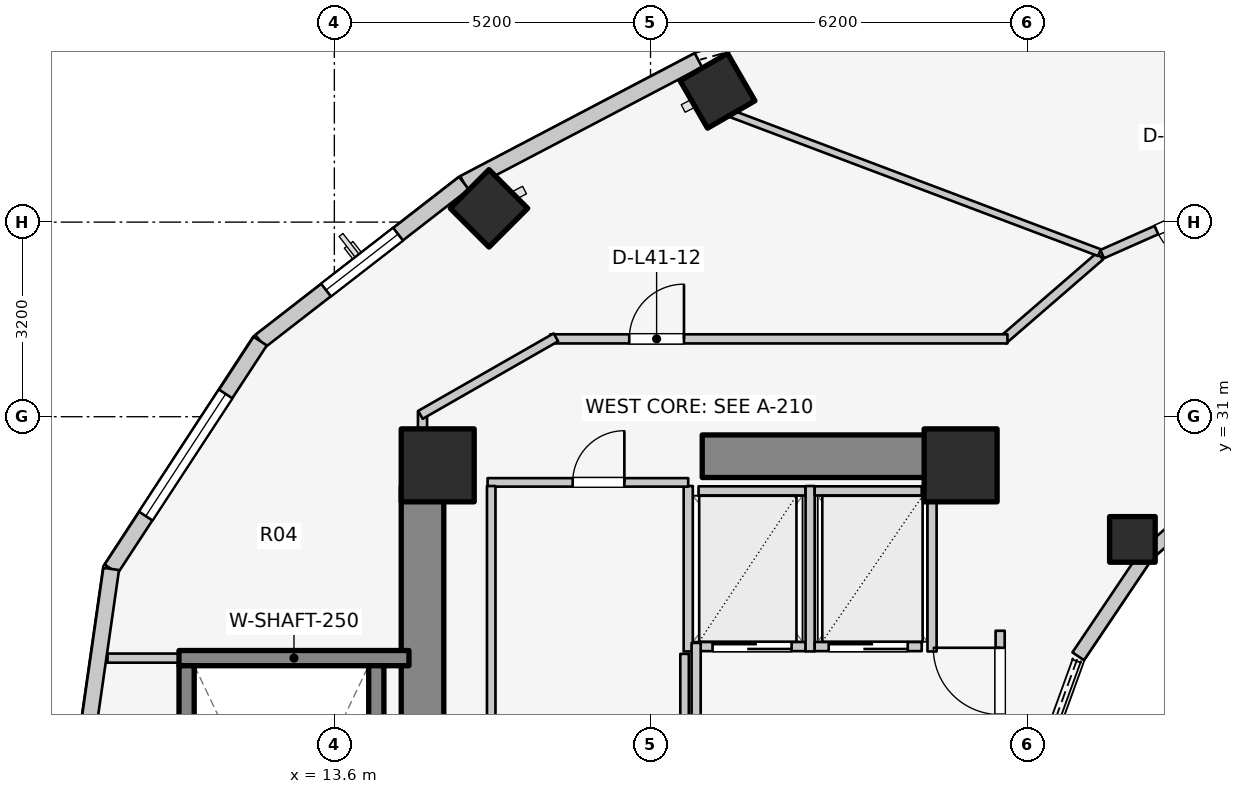
"""IFC4 building model, lengths in metres.
Left out: names, types, materials, properties, quantities, classifications, styles, units other than length and angle.
Written with IfcOpenShell. Run it as: python <this file> out.ifc"""

import sys

from ifc_helpers import new_model, si_unit, direction, frame, frame_2d, origin, origin_2d, place, context, subcontext, project, spatial, rectangle, extrude, element, fill, save


model = new_model("IFC4")
c1 = context("Model", 3, precision=1e-05, world=origin(), true_north=direction((0.0, 1.0)))
c2 = subcontext(c1, "Body", "Model", "MODEL_VIEW")
j1 = project(units=[si_unit("LENGTHUNIT", "METRE"), si_unit("PLANEANGLEUNIT", "RADIAN")], contexts=[c1])
p1 = place(None, origin())
s1 = spatial("IfcSite", under=j1, at=p1, CompositionType="ELEMENT")
p2 = place(p1, origin())
s2 = spatial("IfcBuilding", under=s1, at=p2, CompositionType="ELEMENT")
p3 = place(p2, frame((0.0, 0.0, 137.4)))
s3 = spatial("IfcBuildingStorey", under=s2, at=p3, CompositionType="ELEMENT", Elevation=137.4)
p4 = place(p3, frame((15.05, 17.05, 0.0), z_axis=(0.0, 0.0, 1.0), x_axis=(0.0, 1.0, 0.0)))
e1 = element("IfcWall", 1, at=p4, inside=s3, PredefinedType="SHEAR", context=c2, shape_type="SweptSolid", body=[
    extrude(rectangle(XDim=12.8, YDim=0.7, at=frame_2d((6.4, 0.0))), origin(), (0.0, 0.0, 1.0), 3.1),
])
p5 = place(p3, frame((19.65, 30.35, 0.0), z_axis=(0.0, 0.0, 1.0), x_axis=(1.0, 0.0, 0.0)))
e2 = element("IfcWall", 2, at=p5, inside=s3, PredefinedType="SHEAR", context=c2, shape_type="SweptSolid", body=[
    extrude(rectangle(XDim=4.5, YDim=0.7, at=frame_2d((2.25, 0.0))), origin(), (0.0, 0.0, 1.0), 3.1),
])
p6 = place(p3, frame((11.045, 27.03, 0.0), z_axis=(0.0, 0.0, 1.0), x_axis=(1.0, 0.0, 0.0)))
e3 = element("IfcWall", 3, at=p6, inside=s3, PredefinedType="SOLIDWALL", context=c2, shape_type="SweptSolid", body=[
    extrude(rectangle(XDim=3.782, YDim=0.25, at=frame_2d((1.891, 0.0))), origin(), (0.0, 0.0, 1.0), 3.1),
])
for number, where, z_axis, x_axis in (
    (4, (11.17, 19.095, 0.0), (0.0, 0.0, 1.0), (0.0, 1.0, 0.0)),
    (5, (14.29, 19.095, 0.0), (0.0, 0.0, 1.0), (0.0, 1.0, 0.0)),
):
    element("IfcWall", number, at=place(p3, frame(where, z_axis=z_axis, x_axis=x_axis)), inside=s3, PredefinedType="SOLIDWALL", context=c2, shape_type="SweptSolid", body=[
        extrude(rectangle(XDim=7.81, YDim=0.25, at=frame_2d((3.905, 0.0))), origin(), (0.0, 0.0, 1.0), 3.1),
    ])
for number, where, z_axis, x_axis in (
    (6, (23.9, 30.2, 0.0), (0.0, 0.0, 1.0), (1.0, 0.0, 0.0)),
    (7, (15.3, 30.2, 0.0), (0.0, 0.0, 1.0), (1.0, 0.0, 0.0)),
):
    element("IfcColumn", number, at=place(p3, frame(where, z_axis=z_axis, x_axis=x_axis)), inside=s3, PredefinedType="COLUMN", context=c2, shape_type="SweptSolid", body=[
        extrude(rectangle(XDim=1.2, YDim=1.2, at=origin_2d()), origin(), (0.0, 0.0, 1.0), 3.1),
    ])
p7 = place(p3, frame((19.902, 36.359, 0.0), z_axis=(0.0, 0.0, 1.0), x_axis=(-0.5, 0.866025403784, 0.0)))
e8 = element("IfcColumn", 8, at=p7, inside=s3, PredefinedType="COLUMN", context=c2, shape_type="SweptSolid", body=[
    extrude(rectangle(XDim=0.9, YDim=0.9, at=origin_2d()), origin(), (0.0, 0.0, 1.0), 3.1),
])
p8 = place(p3, frame((26.725, 28.982, 0.0), z_axis=(0.0, 0.0, 1.0), x_axis=(1.0, 0.0, 0.0)))
e9 = element("IfcColumn", 9, at=p8, inside=s3, PredefinedType="COLUMN", context=c2, shape_type="SweptSolid", body=[
    extrude(rectangle(XDim=0.75, YDim=0.75, at=origin_2d()), origin(), (0.0, 0.0, 1.0), 3.1),
])
p9 = place(p3, frame((16.143, 34.427, 0.0), z_axis=(0.0, 0.0, 1.0), x_axis=(-0.707106781187, 0.707106781187, 0.0)))
e10 = element("IfcColumn", 10, at=p9, inside=s3, PredefinedType="COLUMN", context=c2, shape_type="SweptSolid", body=[
    extrude(rectangle(XDim=0.9, YDim=0.9, at=origin_2d()), origin(), (0.0, 0.0, 1.0), 3.1),
])
p10 = place(p3, frame((28.44, 30.032, 0.0), z_axis=(0.0, 0.0, 1.0), x_axis=(-0.752576694707, -0.658504607869, 0.0)))
e11 = element("IfcWall", 11, at=p10, inside=s3, PredefinedType="STANDARD", context=c2, shape_type="SweptSolid", body=[
    extrude(rectangle(XDim=1.959, YDim=0.23, at=frame_2d((0.98, 0.0))), origin(), (0.0, 0.0, 1.0), 2.16),
])
p11 = place(p3, frame((26.965, 28.742, 0.0), z_axis=(0.0, 0.0, 1.0), x_axis=(-0.558197800898, -0.829707909492, 0.0)))
e12 = element("IfcWall", 12, at=p11, inside=s3, PredefinedType="STANDARD", context=c2, shape_type="SweptSolid", body=[
    extrude(rectangle(XDim=2.027, YDim=0.23, at=frame_2d((1.013, 0.0))), origin(), (0.0, 0.0, 1.0), 2.16),
])
p12 = place(p3, frame((19.587, 36.863, 0.0), z_axis=(0.0, 0.0, 1.0), x_axis=(-0.885660265226, -0.464333818065, 0.0)))
e13 = element("IfcWall", 13, at=p12, inside=s3, PredefinedType="STANDARD", context=c2, shape_type="SweptSolid", body=[
    extrude(rectangle(XDim=4.354, YDim=0.26, at=frame_2d((2.177, 0.0))), origin(), (0.0, 0.0, 1.0), 2.85),
])
p13 = place(p3, frame((15.731, 34.842, 0.0), z_axis=(0.0, 0.0, 1.0), x_axis=(-0.790185650662, -0.612867552973, 0.0)))
e14 = element("IfcWall", 14, at=p13, inside=s3, PredefinedType="STANDARD", context=c2, shape_type="SweptSolid", body=[
    extrude(rectangle(XDim=4.239, YDim=0.26, at=frame_2d((2.12, 0.0))), origin(), (0.0, 0.0, 1.0), 2.85),
])
p14 = place(p13, frame((1.37, 0.0, 0.75)))
e15 = element("IfcOpeningElement", 15, at=p14, cuts=e14, PredefinedType="OPENING", context=c2, shape_type="SweptSolid", body=[
    extrude(rectangle(XDim=1.5, YDim=1.6, at=frame_2d((0.75, 0.8))), frame((0.0, 0.14, 0.0), z_axis=(0.0, -1.0, 0.0), x_axis=(1.0, 0.0, 0.0)), (0.0, 0.0, 1.0), 0.28),
])
p15 = place(p3, frame((12.381, 32.243, 0.0), z_axis=(0.0, 0.0, 1.0), x_axis=(-0.547456494366, -0.836834145322, 0.0)))
e16 = element("IfcWall", 16, at=p15, inside=s3, PredefinedType="STANDARD", context=c2, shape_type="SweptSolid", body=[
    extrude(rectangle(XDim=4.477, YDim=0.26, at=frame_2d((2.239, 0.0))), origin(), (0.0, 0.0, 1.0), 2.85),
])
p16 = place(p15, frame((1.039, 0.0, 0.75)))
e17 = element("IfcOpeningElement", 17, at=p16, cuts=e16, PredefinedType="OPENING", context=c2, shape_type="SweptSolid", body=[
    extrude(rectangle(XDim=2.4, YDim=1.7, at=frame_2d((1.2, 0.85))), frame((0.0, 0.14, 0.0), z_axis=(0.0, -1.0, 0.0), x_axis=(1.0, 0.0, 0.0)), (0.0, 0.0, 1.0), 0.28),
])
p17 = place(p3, frame((9.93, 28.497, 0.0), z_axis=(0.0, 0.0, 1.0), x_axis=(-0.142227632286, -0.989833976288, 0.0)))
e18 = element("IfcWall", 18, at=p17, inside=s3, PredefinedType="STANDARD", context=c2, shape_type="SweptSolid", body=[
    extrude(rectangle(XDim=5.553, YDim=0.26, at=frame_2d((2.776, 0.0))), origin(), (0.0, 0.0, 1.0), 2.85),
])
p18 = place(p17, frame((2.892, 0.0, 0.75)))
e19 = element("IfcOpeningElement", 19, at=p18, cuts=e18, PredefinedType="OPENING", context=c2, shape_type="SweptSolid", body=[
    extrude(rectangle(XDim=1.2, YDim=1.5, at=frame_2d((0.6, 0.75))), frame((0.0, 0.14, 0.0), z_axis=(0.0, -1.0, 0.0), x_axis=(1.0, 0.0, 0.0)), (0.0, 0.0, 1.0), 0.28),
])
p19 = place(p3, frame((19.59, 27.22, 0.0), z_axis=(0.0, 0.0, 1.0), x_axis=(1.0, 0.0, 0.0)))
e20 = element("IfcWall", 20, at=p19, inside=s3, PredefinedType="SOLIDWALL", context=c2, shape_type="SweptSolid", body=[
    extrude(rectangle(XDim=1.76, YDim=0.15, at=frame_2d((0.88, 0.0))), origin(), (0.0, 0.0, 1.0), 2.855),
])
p20 = place(p19, frame((0.23, 0.0, 0.0)))
e21 = element("IfcOpeningElement", 21, at=p20, cuts=e20, PredefinedType="OPENING", context=c2, shape_type="SweptSolid", body=[
    extrude(rectangle(XDim=1.3, YDim=2.1, at=frame_2d((0.65, 1.05))), frame((0.0, 0.085, 0.0), z_axis=(0.0, -1.0, 0.0), x_axis=(1.0, 0.0, 0.0)), (0.0, 0.0, 1.0), 0.17),
])
p21 = place(p3, frame((19.59, 29.78, 0.0), z_axis=(0.0, 0.0, 1.0), x_axis=(1.0, 0.0, 0.0)))
e22 = element("IfcWall", 22, at=p21, inside=s3, PredefinedType="SOLIDWALL", context=c2, shape_type="SweptSolid", body=[
    extrude(rectangle(XDim=1.76, YDim=0.15, at=frame_2d((0.88, 0.0))), origin(), (0.0, 0.0, 1.0), 2.855),
])
for number, where, z_axis, x_axis in (
    (23, (19.42, 27.14, 0.0), (0.0, 0.0, 1.0), (0.0, 1.0, 0.0)),
    (24, (21.425, 27.14, 0.0), (0.0, 0.0, 1.0), (0.0, 1.0, 0.0)),
):
    element("IfcWall", number, at=place(p3, frame(where, z_axis=z_axis, x_axis=x_axis)), inside=s3, PredefinedType="SOLIDWALL", context=c2, shape_type="SweptSolid", body=[
        extrude(rectangle(XDim=2.72, YDim=0.15, at=frame_2d((1.36, 0.0))), origin(), (0.0, 0.0, 1.0), 2.855),
    ])
p22 = place(p3, frame((21.5, 27.22, 0.0), z_axis=(0.0, 0.0, 1.0), x_axis=(1.0, 0.0, 0.0)))
e25 = element("IfcWall", 25, at=p22, inside=s3, PredefinedType="SOLIDWALL", context=c2, shape_type="SweptSolid", body=[
    extrude(rectangle(XDim=1.76, YDim=0.15, at=frame_2d((0.88, 0.0))), origin(), (0.0, 0.0, 1.0), 2.855),
])
p23 = place(p22, frame((0.23, 0.0, 0.0)))
e26 = element("IfcOpeningElement", 26, at=p23, cuts=e25, PredefinedType="OPENING", context=c2, shape_type="SweptSolid", body=[
    extrude(rectangle(XDim=1.3, YDim=2.1, at=frame_2d((0.65, 1.05))), frame((0.0, 0.085, 0.0), z_axis=(0.0, -1.0, 0.0), x_axis=(1.0, 0.0, 0.0)), (0.0, 0.0, 1.0), 0.17),
])
p24 = place(p3, frame((21.5, 29.78, 0.0), z_axis=(0.0, 0.0, 1.0), x_axis=(1.0, 0.0, 0.0)))
e27 = element("IfcWall", 27, at=p24, inside=s3, PredefinedType="SOLIDWALL", context=c2, shape_type="SweptSolid", body=[
    extrude(rectangle(XDim=1.76, YDim=0.15, at=frame_2d((0.88, 0.0))), origin(), (0.0, 0.0, 1.0), 2.855),
])
p25 = place(p3, frame((23.43, 27.14, 0.0), z_axis=(0.0, 0.0, 1.0), x_axis=(0.0, 1.0, 0.0)))
e28 = element("IfcWall", 28, at=p25, inside=s3, PredefinedType="SOLIDWALL", context=c2, shape_type="SweptSolid", body=[
    extrude(rectangle(XDim=2.72, YDim=0.15, at=frame_2d((1.36, 0.0))), origin(), (0.0, 0.0, 1.0), 2.855),
])
p26 = place(p3, frame((19.55, 24.08, 0.0), z_axis=(0.0, 0.0, 1.0), x_axis=(0.0, 1.0, 0.0)))
e29 = element("IfcWall", 29, at=p26, inside=s3, PredefinedType="PARTITIONING", context=c2, shape_type="SweptSolid", body=[
    extrude(rectangle(XDim=3.2, YDim=0.15, at=frame_2d((1.6, 0.0))), origin(), (0.0, 0.0, 1.0), 2.855),
])
p27 = place(p3, frame((24.55, 24.08, 0.0), z_axis=(0.0, 0.0, 1.0), x_axis=(0.0, 1.0, 0.0)))
e30 = element("IfcWall", 30, at=p27, inside=s3, PredefinedType="PARTITIONING", context=c2, shape_type="SweptSolid", body=[
    extrude(rectangle(XDim=3.4, YDim=0.15, at=frame_2d((1.7, 0.0))), origin(), (0.0, 0.0, 1.0), 2.855),
])
p28 = place(p27, frame((2.02, 0.0, 0.0)))
e31 = element("IfcOpeningElement", 31, at=p28, cuts=e30, PredefinedType="OPENING", context=c2, shape_type="SweptSolid", body=[
    extrude(rectangle(XDim=1.1, YDim=2.1, at=frame_2d((0.55, 1.05))), frame((0.0, 0.085, 0.0), z_axis=(0.0, -1.0, 0.0), x_axis=(1.0, 0.0, 0.0)), (0.0, 0.0, 1.0), 0.17),
])
p29 = place(p3, frame((16.12, 29.92, 0.0), z_axis=(0.0, 0.0, 1.0), x_axis=(1.0, 0.0, 0.0)))
e32 = element("IfcWall", 32, at=p29, inside=s3, PredefinedType="PLUMBINGWALL", context=c2, shape_type="SweptSolid", body=[
    extrude(rectangle(XDim=3.3, YDim=0.14, at=frame_2d((1.65, 0.0))), origin(), (0.0, 0.0, 1.0), 2.855),
])
p30 = place(p29, frame((1.399, 0.0, 0.0)))
e33 = element("IfcOpeningElement", 33, at=p30, cuts=e32, PredefinedType="OPENING", context=c2, shape_type="SweptSolid", body=[
    extrude(rectangle(XDim=0.85, YDim=2.05, at=frame_2d((0.425, 1.025))), frame((0.0, 0.08, 0.0), z_axis=(0.0, -1.0, 0.0), x_axis=(1.0, 0.0, 0.0)), (0.0, 0.0, 1.0), 0.16),
])
p31 = place(p3, frame((16.18, 25.98, 0.0), z_axis=(0.0, 0.0, 1.0), x_axis=(0.0, 1.0, 0.0)))
e34 = element("IfcWall", 34, at=p31, inside=s3, PredefinedType="PLUMBINGWALL", context=c2, shape_type="SweptSolid", body=[
    extrude(rectangle(XDim=3.88, YDim=0.14, at=frame_2d((1.94, 0.0))), origin(), (0.0, 0.0, 1.0), 2.855),
])
p32 = place(p3, frame((19.36, 25.98, 0.0), z_axis=(0.0, 0.0, 1.0), x_axis=(0.0, 1.0, 0.0)))
e35 = element("IfcWall", 35, at=p32, inside=s3, PredefinedType="PLUMBINGWALL", context=c2, shape_type="SweptSolid", body=[
    extrude(rectangle(XDim=1.12, YDim=0.14, at=frame_2d((0.56, 0.0))), origin(), (0.0, 0.0, 1.0), 2.855),
])
p33 = place(p3, frame((9.87, 27.03, 0.0), z_axis=(0.0, 0.0, 1.0), x_axis=(1.0, 0.0, 0.0)))
e36 = element("IfcWall", 36, at=p33, inside=s3, PredefinedType="PARTITIONING", context=c2, shape_type="SweptSolid", body=[
    extrude(rectangle(XDim=1.17, YDim=0.15, at=frame_2d((0.585, 0.0))), origin(), (0.0, 0.0, 1.0), 2.855),
])
p34 = place(p3, frame((15.05, 29.8, 0.0), z_axis=(0.0, 0.0, 1.0), x_axis=(0.0, 1.0, 0.0)))
e37 = element("IfcWall", 37, at=p34, inside=s3, PredefinedType="PARTITIONING", context=c2, shape_type="SweptSolid", body=[
    extrude(rectangle(XDim=1.29, YDim=0.15, at=frame_2d((0.645, 0.0))), origin(), (0.0, 0.0, 1.0), 2.855),
])
p35 = place(p3, frame((26.193, 33.642, 0.0), z_axis=(0.0, 0.0, 1.0), x_axis=(-0.756055312247, -0.654507727092, 0.0)))
e38 = element("IfcWall", 38, at=p35, inside=s3, PredefinedType="PARTITIONING", context=c2, shape_type="SweptSolid", body=[
    extrude(rectangle(XDim=2.111, YDim=0.15, at=frame_2d((1.055, 0.0))), origin(), (0.0, 0.0, 1.0), 2.299),
])
p36 = place(p3, frame((17.15, 32.28, 0.0), z_axis=(0.0, 0.0, 1.0), x_axis=(1.0, 0.0, 0.0)))
e39 = element("IfcWall", 39, at=p36, inside=s3, PredefinedType="PARTITIONING", context=c2, shape_type="SweptSolid", body=[
    extrude(rectangle(XDim=7.52, YDim=0.15, at=frame_2d((3.76, 0.0))), origin(), (0.0, 0.0, 1.0), 2.299),
])
p37 = place(p36, frame((1.3, 0.0, 0.0)))
e40 = element("IfcOpeningElement", 40, at=p37, cuts=e39, PredefinedType="OPENING", context=c2, shape_type="SweptSolid", body=[
    extrude(rectangle(XDim=0.9, YDim=2.1, at=frame_2d((0.45, 1.05))), frame((0.0, 0.085, 0.0), z_axis=(0.0, -1.0, 0.0), x_axis=(1.0, 0.0, 0.0)), (0.0, 0.0, 1.0), 0.17),
])
p38 = place(p3, frame((17.243, 32.305, 0.0), z_axis=(0.0, 0.0, 1.0), x_axis=(-0.867991349648, -0.496579315857, 0.0)))
e41 = element("IfcWall", 41, at=p38, inside=s3, PredefinedType="PARTITIONING", context=c2, shape_type="SweptSolid", body=[
    extrude(rectangle(XDim=2.567, YDim=0.15, at=frame_2d((1.283, 0.0))), origin(), (0.0, 0.0, 1.0), 2.22),
])
p39 = place(p3, frame((26.184, 33.698, 0.0), z_axis=(0.0, 0.0, 1.0), x_axis=(-0.935601484289, 0.353057874288, 0.0)))
e42 = element("IfcWall", 42, at=p39, inside=s3, PredefinedType="MOVABLE", context=c2, shape_type="SweptSolid", body=[
    extrude(rectangle(XDim=6.484, YDim=0.12, at=frame_2d((3.242, 0.0))), origin(), (0.0, 0.0, 1.0), 2.299),
])
p40 = place(p3, frame((29.018, 34.91, 0.0), z_axis=(0.0, 0.0, 1.0), x_axis=(-0.914216890927, -0.405225216815, 0.0)))
e43 = element("IfcWall", 43, at=p40, inside=s3, PredefinedType="PARTITIONING", context=c2, shape_type="SweptSolid", body=[
    extrude(rectangle(XDim=3.052, YDim=0.15, at=frame_2d((1.526, 0.0))), origin(), (0.0, 0.0, 1.0), 2.299),
])
p41 = place(p40, frame((0.976, 0.0, 0.0)))
e44 = element("IfcOpeningElement", 44, at=p41, cuts=e43, PredefinedType="OPENING", context=c2, shape_type="SweptSolid", body=[
    extrude(rectangle(XDim=1.1, YDim=2.1, at=frame_2d((0.55, 1.05))), frame((0.0, 0.085, 0.0), z_axis=(0.0, -1.0, 0.0), x_axis=(1.0, 0.0, 0.0)), (0.0, 0.0, 1.0), 0.17),
])
p42 = place(p14, origin())
e45 = element("IfcWindow", 45, at=p42, inside=s3, PartitioningType="SINGLE_PANEL", PredefinedType="WINDOW", context=c2, shape_type="SweptSolid", body=[
    extrude(rectangle(XDim=1.5, YDim=1.6, at=frame_2d((0.75, 0.8))), frame((0.0, 0.03, 0.0), z_axis=(0.0, -1.0, 0.0), x_axis=(1.0, 0.0, 0.0)), (0.0, 0.0, 1.0), 0.06),
])
fill(e15, e45)
p43 = place(p16, origin())
e46 = element("IfcWindow", 46, at=p43, inside=s3, PartitioningType="SINGLE_PANEL", PredefinedType="WINDOW", context=c2, shape_type="SweptSolid", body=[
    extrude(rectangle(XDim=2.4, YDim=1.7, at=frame_2d((1.2, 0.85))), frame((0.0, 0.03, 0.0), z_axis=(0.0, -1.0, 0.0), x_axis=(1.0, 0.0, 0.0)), (0.0, 0.0, 1.0), 0.06),
])
fill(e17, e46)
p44 = place(p20, origin())
e47 = element("IfcDoor", 47, at=p44, inside=s3, OperationType="DOUBLE_DOOR_SLIDING", PredefinedType="DOOR", context=c2, shape_type="SweptSolid", body=[
    extrude(rectangle(XDim=1.3, YDim=2.1, at=frame_2d((0.65, 1.05))), frame((0.0, 0.025, 0.0), z_axis=(0.0, -1.0, 0.0), x_axis=(1.0, 0.0, 0.0)), (0.0, 0.0, 1.0), 0.05),
])
fill(e21, e47)
p45 = place(p23, origin())
e48 = element("IfcDoor", 48, at=p45, inside=s3, OperationType="DOUBLE_DOOR_SLIDING", PredefinedType="DOOR", context=c2, shape_type="SweptSolid", body=[
    extrude(rectangle(XDim=1.3, YDim=2.1, at=frame_2d((0.65, 1.05))), frame((0.0, 0.025, 0.0), z_axis=(0.0, -1.0, 0.0), x_axis=(1.0, 0.0, 0.0)), (0.0, 0.0, 1.0), 0.05),
])
fill(e26, e48)
p46 = place(p28, origin())
e49 = element("IfcDoor", 49, at=p46, inside=s3, OperationType="SINGLE_SWING_RIGHT", PredefinedType="DOOR", context=c2, shape_type="SweptSolid", body=[
    extrude(rectangle(XDim=1.1, YDim=2.1, at=frame_2d((0.55, 1.05))), frame((0.0, 0.025, 0.0), z_axis=(0.0, -1.0, 0.0), x_axis=(1.0, 0.0, 0.0)), (0.0, 0.0, 1.0), 0.05),
])
fill(e31, e49)
p47 = place(p30, origin())
e50 = element("IfcDoor", 50, at=p47, inside=s3, OperationType="SINGLE_SWING_RIGHT", PredefinedType="DOOR", context=c2, shape_type="SweptSolid", body=[
    extrude(rectangle(XDim=0.85, YDim=2.05, at=frame_2d((0.425, 1.025))), frame((0.0, 0.025, 0.0), z_axis=(0.0, -1.0, 0.0), x_axis=(1.0, 0.0, 0.0)), (0.0, 0.0, 1.0), 0.05),
])
fill(e33, e50)
p48 = place(p37, origin())
e51 = element("IfcDoor", 51, at=p48, inside=s3, OperationType="SINGLE_SWING_RIGHT", PredefinedType="DOOR", context=c2, shape_type="SweptSolid", body=[
    extrude(rectangle(XDim=0.9, YDim=2.1, at=frame_2d((0.45, 1.05))), frame((0.0, 0.025, 0.0), z_axis=(0.0, -1.0, 0.0), x_axis=(1.0, 0.0, 0.0)), (0.0, 0.0, 1.0), 0.05),
])
fill(e40, e51)
p49 = place(p41, origin())
e52 = element("IfcDoor", 52, at=p49, inside=s3, OperationType="SINGLE_SWING_LEFT", PredefinedType="DOOR", context=c2, shape_type="SweptSolid", body=[
    extrude(rectangle(XDim=1.1, YDim=2.1, at=frame_2d((0.55, 1.05))), frame((0.0, 0.025, 0.0), z_axis=(0.0, -1.0, 0.0), x_axis=(1.0, 0.0, 0.0)), (0.0, 0.0, 1.0), 0.05),
])
fill(e44, e52)
save(model, sys.argv[1])
